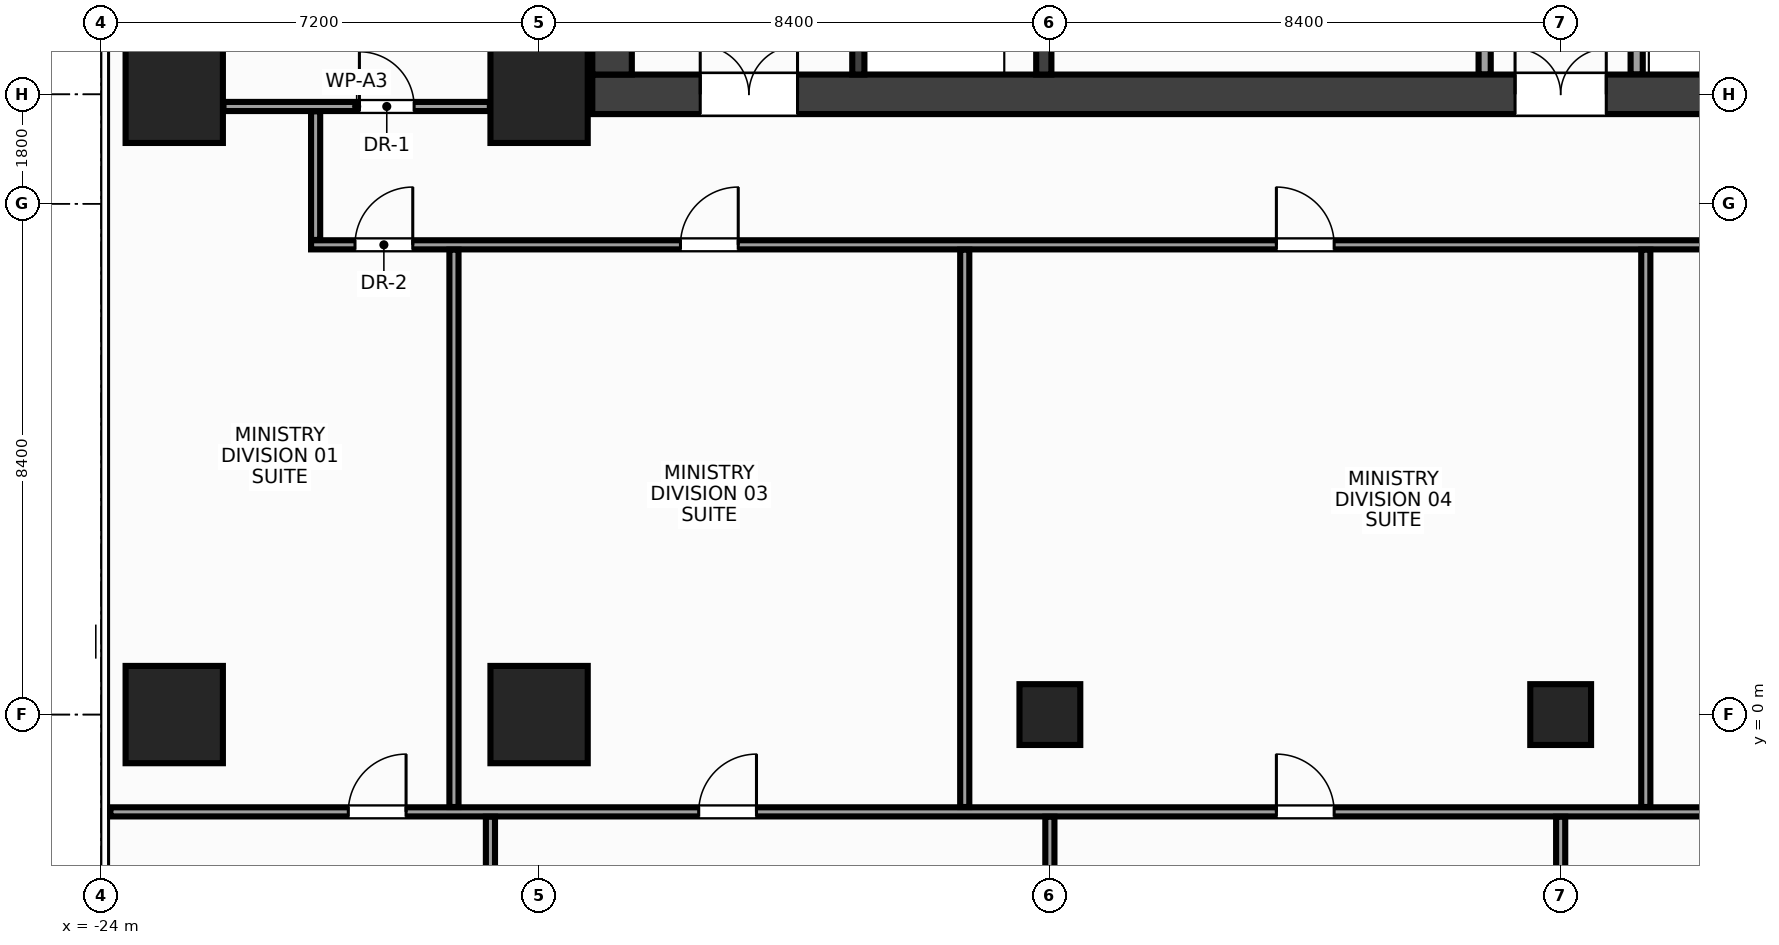
"""IFC4 building model, lengths in metres.
Left out: names, types, materials, properties, quantities, classifications, styles, units other than length and angle.
Written with IfcOpenShell. Run it as: python <this file> out.ifc"""

import sys

from ifc_helpers import new_model, si_unit, direction, frame, frame_2d, origin, origin_with_axes, origin_2d, place, context, subcontext, project, spatial, rectangle, hollow_rectangle, extrude, source, transform, mapped, element, fill, save


model = new_model("IFC4")
c1 = context("Model", 3, precision=1e-05, world=origin(), true_north=direction((0.0, 1.0)))
c2 = subcontext(c1, "Body", "Model", "MODEL_VIEW")
j1 = project(units=[si_unit("LENGTHUNIT", "METRE"), si_unit("PLANEANGLEUNIT", "RADIAN")], contexts=[c1])
p1 = place(None, origin())
s1 = spatial("IfcSite", under=j1, at=p1, CompositionType="ELEMENT")
p2 = place(p1, origin())
s2 = spatial("IfcBuilding", under=s1, at=p2, CompositionType="ELEMENT")
p3 = place(p2, frame((0.0, 0.0, 149.6)))
s3 = spatial("IfcBuildingStorey", under=s2, at=p3, CompositionType="ELEMENT", Elevation=149.6)
m1 = source(origin(), c2, "Body", "SweptSolid", [
    extrude(rectangle(XDim=31.85, YDim=0.65, at=frame_2d((15.925, 0.0))), origin(), (0.0, 0.0, 1.0), 3.6),
])
p4 = place(p3, frame((-15.925, 10.2, 0.0), z_axis=(0.0, 0.0, 1.0), x_axis=(1.0, 0.0, 0.0)))
e1 = element("IfcWall", 1, at=p4, inside=s3, PredefinedType="SHEAR", context=c2, shape_type="MappedRepresentation", body=[
    mapped(m1, transform((0.0, 0.0, 0.0), x_axis=(1.0, 0.0, 0.0), y_axis=(0.0, 1.0, 0.0), z_axis=(0.0, 0.0, 1.0), scale=1.0)),
])
p5 = place(p4, frame((1.775, 0.0, 0.0)))
e2 = element("IfcOpeningElement", 2, at=p5, cuts=e1, PredefinedType="OPENING", context=c2, shape_type="SweptSolid", body=[
    extrude(rectangle(XDim=1.6, YDim=2.15, at=frame_2d((0.8, 1.075))), frame((0.0, 0.337, 0.0), z_axis=(0.0, -1.0, 0.0), x_axis=(1.0, 0.0, 0.0)), (0.0, 0.0, 1.0), 0.674),
])
p6 = place(p4, frame((28.475, 0.0, 0.0)))
e3 = element("IfcOpeningElement", 3, at=p6, cuts=e1, PredefinedType="OPENING", context=c2, shape_type="SweptSolid", body=[
    extrude(rectangle(XDim=1.6, YDim=2.15, at=frame_2d((0.8, 1.075))), frame((0.0, 0.337, 0.0), z_axis=(0.0, -1.0, 0.0), x_axis=(1.0, 0.0, 0.0)), (0.0, 0.0, 1.0), 0.674),
])
p7 = place(p4, frame((15.175, 0.0, 0.0)))
e4 = element("IfcOpeningElement", 4, at=p7, cuts=e1, PredefinedType="OPENING", context=c2, shape_type="SweptSolid", body=[
    extrude(rectangle(XDim=1.5, YDim=2.2, at=frame_2d((0.75, 1.1))), frame((0.0, 0.337, 0.0), z_axis=(0.0, -1.0, 0.0), x_axis=(1.0, 0.0, 0.0)), (0.0, 0.0, 1.0), 0.674),
])
m2 = source(origin(), c2, "Body", "SweptSolid", [
    extrude(rectangle(XDim=12.95, YDim=0.65, at=frame_2d((6.475, 0.0))), origin(), (0.0, 0.0, 1.0), 3.6),
])
p8 = place(p3, frame((-15.6, 10.525, 0.0), z_axis=(0.0, 0.0, 1.0), x_axis=(0.0, 1.0, 0.0)))
e5 = element("IfcWall", 5, at=p8, inside=s3, PredefinedType="SHEAR", context=c2, shape_type="MappedRepresentation", body=[
    mapped(m2, transform((0.0, 0.0, 0.0), x_axis=(1.0, 0.0, 0.0), y_axis=(0.0, 1.0, 0.0), z_axis=(0.0, 0.0, 1.0), scale=1.0)),
])
m3 = source(origin(), c2, "Body", "SweptSolid", [
    extrude(rectangle(XDim=12.95, YDim=0.25, at=frame_2d((6.475, 0.0))), origin(), (0.0, 0.0, 1.0), 3.6),
])
p9 = place(p3, frame((-8.5, 10.525, 0.0), z_axis=(0.0, 0.0, 1.0), x_axis=(0.0, 1.0, 0.0)))
e6 = element("IfcWall", 6, at=p9, inside=s3, PredefinedType="SHEAR", context=c2, shape_type="MappedRepresentation", body=[
    mapped(m3, transform((0.0, 0.0, 0.0), x_axis=(1.0, 0.0, 0.0), y_axis=(0.0, 1.0, 0.0), z_axis=(0.0, 0.0, 1.0), scale=1.0)),
])
p10 = place(p9, frame((4.145, 0.0, 0.0)))
e7 = element("IfcOpeningElement", 7, at=p10, cuts=e6, PredefinedType="OPENING", context=c2, shape_type="SweptSolid", body=[
    extrude(rectangle(XDim=1.1, YDim=2.15, at=frame_2d((0.55, 1.075))), frame((0.0, 0.137, 0.0), z_axis=(0.0, -1.0, 0.0), x_axis=(1.0, 0.0, 0.0)), (0.0, 0.0, 1.0), 0.274),
])
p11 = place(p9, frame((6.065, 0.0, 0.0)))
e8 = element("IfcOpeningElement", 8, at=p11, cuts=e6, PredefinedType="OPENING", context=c2, shape_type="SweptSolid", body=[
    extrude(rectangle(XDim=1.1, YDim=2.15, at=frame_2d((0.55, 1.075))), frame((0.0, 0.137, 0.0), z_axis=(0.0, -1.0, 0.0), x_axis=(1.0, 0.0, 0.0)), (0.0, 0.0, 1.0), 0.274),
])
p12 = place(p9, frame((7.985, 0.0, 0.0)))
e9 = element("IfcOpeningElement", 9, at=p12, cuts=e6, PredefinedType="OPENING", context=c2, shape_type="SweptSolid", body=[
    extrude(rectangle(XDim=1.1, YDim=2.15, at=frame_2d((0.55, 1.075))), frame((0.0, 0.137, 0.0), z_axis=(0.0, -1.0, 0.0), x_axis=(1.0, 0.0, 0.0)), (0.0, 0.0, 1.0), 0.274),
])
m4 = source(origin(), c2, "Body", "SweptSolid", [
    extrude(rectangle(XDim=3.125, YDim=0.2, at=frame_2d((1.562, 0.0))), origin(), (0.0, 0.0, 1.0), 3.6),
])
p13 = place(p3, frame((-11.55, 10.525, 0.0), z_axis=(0.0, 0.0, 1.0), x_axis=(0.0, 1.0, 0.0)))
e10 = element("IfcWall", 10, at=p13, inside=s3, PredefinedType="SHEAR", context=c2, shape_type="MappedRepresentation", body=[
    mapped(m4, transform((0.0, 0.0, 0.0), x_axis=(1.0, 0.0, 0.0), y_axis=(0.0, 1.0, 0.0), z_axis=(0.0, 0.0, 1.0), scale=1.0)),
])
p14 = place(p13, frame((0.9, 0.0, 0.0)))
e11 = element("IfcOpeningElement", 11, at=p14, cuts=e10, PredefinedType="OPENING", context=c2, shape_type="SweptSolid", body=[
    extrude(rectangle(XDim=1.1, YDim=2.15, at=frame_2d((0.55, 1.075))), frame((0.0, 0.112, 0.0), z_axis=(0.0, -1.0, 0.0), x_axis=(1.0, 0.0, 0.0)), (0.0, 0.0, 1.0), 0.224),
])
m5 = source(origin(), c2, "Body", "SweptSolid", [
    extrude(rectangle(XDim=1.6, YDim=1.6, at=origin_2d()), origin(), (0.0, 0.0, 1.0), 3.6),
])
for number, where, z_axis, x_axis in (
    (12, (-16.8, 0.0, 0.0), (0.0, 0.0, 1.0), (1.0, 0.0, 0.0)),
    (13, (-16.8, 10.2, 0.0), (0.0, 0.0, 1.0), (1.0, 0.0, 0.0)),
    (14, (-22.8, 0.0, 0.0), (0.0, 0.0, 1.0), (1.0, 0.0, 0.0)),
    (15, (-22.8, 10.2, 0.0), (0.0, 0.0, 1.0), (1.0, 0.0, 0.0)),
):
    element("IfcColumn", number, at=place(p3, frame(where, z_axis=z_axis, x_axis=x_axis)), inside=s3, PredefinedType="COLUMN", context=c2, shape_type="MappedRepresentation", body=[
        mapped(m5, transform((0.0, 0.0, 0.0), x_axis=(1.0, 0.0, 0.0), y_axis=(0.0, 1.0, 0.0), z_axis=(0.0, 0.0, 1.0), scale=1.0)),
    ])
m6 = source(origin(), c2, "Body", "SweptSolid", [
    extrude(hollow_rectangle(XDim=1.0, YDim=1.0, WallThickness=0.045, at=origin_2d()), origin(), (0.0, 0.0, 1.0), 3.6),
])
p15 = place(p3, frame((-8.4, 0.0, 0.0), z_axis=(0.0, 0.0, 1.0), x_axis=(1.0, 0.0, 0.0)))
e16 = element("IfcColumn", 16, at=p15, inside=s3, PredefinedType="COLUMN", context=c2, shape_type="MappedRepresentation", body=[
    mapped(m6, transform((0.0, 0.0, 0.0), x_axis=(1.0, 0.0, 0.0), y_axis=(0.0, 1.0, 0.0), z_axis=(0.0, 0.0, 1.0), scale=1.0)),
])
m7 = source(origin(), c2, "Body", "SweptSolid", [
    extrude(rectangle(XDim=1.0, YDim=1.0, at=origin_2d()), origin(), (0.0, 0.0, 1.0), 3.6),
])
p16 = place(p3, origin_with_axes())
e17 = element("IfcColumn", 17, at=p16, inside=s3, PredefinedType="COLUMN", context=c2, shape_type="MappedRepresentation", body=[
    mapped(m7, transform((0.0, 0.0, 0.0), x_axis=(1.0, 0.0, 0.0), y_axis=(0.0, 1.0, 0.0), z_axis=(0.0, 0.0, 1.0), scale=1.0)),
])
m8 = source(origin(), c2, "Body", "SweptSolid", [
    extrude(rectangle(XDim=3.415, YDim=0.2, at=frame_2d((1.708, 0.0))), origin(), (0.0, 0.0, 1.0), 3.38),
])
for number, where, z_axis, x_axis in (
    (18, (-1.25, 10.525, 0.0), (0.0, 0.0, 1.0), (0.0, 1.0, 0.0)),
    (19, (1.25, 10.525, 0.0), (0.0, 0.0, 1.0), (0.0, 1.0, 0.0)),
):
    element("IfcWall", number, at=place(p3, frame(where, z_axis=z_axis, x_axis=x_axis)), inside=s3, PredefinedType="PARTITIONING", context=c2, shape_type="MappedRepresentation", body=[
        mapped(m8, transform((0.0, 0.0, 0.0), x_axis=(1.0, 0.0, 0.0), y_axis=(0.0, 1.0, 0.0), z_axis=(0.0, 0.0, 1.0), scale=1.0)),
    ])
m9 = source(origin(), c2, "Body", "SweptSolid", [
    extrude(rectangle(XDim=4.38, YDim=0.15, at=frame_2d((2.19, 0.0))), origin(), (0.0, 0.0, 1.0), 2.915),
])
p17 = place(p3, frame((-21.99, 10.0, 0.0), z_axis=(0.0, 0.0, 1.0), x_axis=(1.0, 0.0, 0.0)))
e20 = element("IfcWall", 20, at=p17, inside=s3, PredefinedType="PARTITIONING", context=c2, shape_type="MappedRepresentation", body=[
    mapped(m9, transform((0.0, 0.0, 0.0), x_axis=(1.0, 0.0, 0.0), y_axis=(0.0, 1.0, 0.0), z_axis=(0.0, 0.0, 1.0), scale=1.0)),
])
p18 = place(p17, frame((2.235, 0.0, 0.0)))
e21 = element("IfcOpeningElement", 21, at=p18, cuts=e20, PredefinedType="OPENING", context=c2, shape_type="SweptSolid", body=[
    extrude(rectangle(XDim=0.9, YDim=2.15, at=frame_2d((0.45, 1.075))), frame((0.0, 0.087, 0.0), z_axis=(0.0, -1.0, 0.0), x_axis=(1.0, 0.0, 0.0)), (0.0, 0.0, 1.0), 0.174),
])
m10 = source(origin(), c2, "Body", "SweptSolid", [
    extrude(rectangle(XDim=31.6, YDim=0.15, at=frame_2d((15.8, 0.0))), origin(), (0.0, 0.0, 1.0), 2.765),
])
p19 = place(p3, frame((-20.55, 7.725, 0.0), z_axis=(0.0, 0.0, 1.0), x_axis=(1.0, 0.0, 0.0)))
e22 = element("IfcWall", 22, at=p19, inside=s3, PredefinedType="PARTITIONING", context=c2, shape_type="MappedRepresentation", body=[
    mapped(m10, transform((0.0, 0.0, 0.0), x_axis=(1.0, 0.0, 0.0), y_axis=(0.0, 1.0, 0.0), z_axis=(0.0, 0.0, 1.0), scale=1.0)),
])
p20 = place(p19, frame((0.722, 0.0, 0.0)))
e23 = element("IfcOpeningElement", 23, at=p20, cuts=e22, PredefinedType="OPENING", context=c2, shape_type="SweptSolid", body=[
    extrude(rectangle(XDim=0.95, YDim=2.15, at=frame_2d((0.475, 1.075))), frame((0.0, 0.087, 0.0), z_axis=(0.0, -1.0, 0.0), x_axis=(1.0, 0.0, 0.0)), (0.0, 0.0, 1.0), 0.174),
])
p21 = place(p19, frame((6.075, 0.0, 0.0)))
e24 = element("IfcOpeningElement", 24, at=p21, cuts=e22, PredefinedType="OPENING", context=c2, shape_type="SweptSolid", body=[
    extrude(rectangle(XDim=0.95, YDim=2.15, at=frame_2d((0.475, 1.075))), frame((0.0, 0.087, 0.0), z_axis=(0.0, -1.0, 0.0), x_axis=(1.0, 0.0, 0.0)), (0.0, 0.0, 1.0), 0.174),
])
p22 = place(p19, frame((15.875, 0.0, 0.0)))
e25 = element("IfcOpeningElement", 25, at=p22, cuts=e22, PredefinedType="OPENING", context=c2, shape_type="SweptSolid", body=[
    extrude(rectangle(XDim=0.95, YDim=2.15, at=frame_2d((0.475, 1.075))), frame((0.0, 0.087, 0.0), z_axis=(0.0, -1.0, 0.0), x_axis=(1.0, 0.0, 0.0)), (0.0, 0.0, 1.0), 0.174),
])
p23 = place(p19, frame((26.278, 0.0, 0.0)))
e26 = element("IfcOpeningElement", 26, at=p23, cuts=e22, PredefinedType="OPENING", context=c2, shape_type="SweptSolid", body=[
    extrude(rectangle(XDim=0.95, YDim=2.15, at=frame_2d((0.475, 1.075))), frame((0.0, 0.087, 0.0), z_axis=(0.0, -1.0, 0.0), x_axis=(1.0, 0.0, 0.0)), (0.0, 0.0, 1.0), 0.174),
])
m11 = source(origin(), c2, "Body", "SweptSolid", [
    extrude(rectangle(XDim=2.115, YDim=0.15, at=frame_2d((1.058, 0.0))), origin(), (0.0, 0.0, 1.0), 3.38),
])
p24 = place(p3, frame((-20.475, 7.805, 0.0), z_axis=(0.0, 0.0, 1.0), x_axis=(0.0, 1.0, 0.0)))
e27 = element("IfcWall", 27, at=p24, inside=s3, PredefinedType="PARTITIONING", context=c2, shape_type="MappedRepresentation", body=[
    mapped(m11, transform((0.0, 0.0, 0.0), x_axis=(1.0, 0.0, 0.0), y_axis=(0.0, 1.0, 0.0), z_axis=(0.0, 0.0, 1.0), scale=1.0)),
])
m12 = source(origin(), c2, "Body", "SweptSolid", [
    extrude(rectangle(XDim=34.895, YDim=0.15, at=frame_2d((17.448, 0.0))), origin(), (0.0, 0.0, 1.0), 2.765),
])
p25 = place(p3, frame((-23.85, -1.6, 0.0), z_axis=(0.0, 0.0, 1.0), x_axis=(1.0, 0.0, 0.0)))
e28 = element("IfcWall", 28, at=p25, inside=s3, PredefinedType="PARTITIONING", context=c2, shape_type="MappedRepresentation", body=[
    mapped(m12, transform((0.0, 0.0, 0.0), x_axis=(1.0, 0.0, 0.0), y_axis=(0.0, 1.0, 0.0), z_axis=(0.0, 0.0, 1.0), scale=1.0)),
])
p26 = place(p25, frame((3.913, 0.0, 0.0)))
e29 = element("IfcOpeningElement", 29, at=p26, cuts=e28, PredefinedType="OPENING", context=c2, shape_type="SweptSolid", body=[
    extrude(rectangle(XDim=0.95, YDim=2.15, at=frame_2d((0.475, 1.075))), frame((0.0, 0.087, 0.0), z_axis=(0.0, -1.0, 0.0), x_axis=(1.0, 0.0, 0.0)), (0.0, 0.0, 1.0), 0.174),
])
p27 = place(p25, frame((9.675, 0.0, 0.0)))
e30 = element("IfcOpeningElement", 30, at=p27, cuts=e28, PredefinedType="OPENING", context=c2, shape_type="SweptSolid", body=[
    extrude(rectangle(XDim=0.95, YDim=2.15, at=frame_2d((0.475, 1.075))), frame((0.0, 0.087, 0.0), z_axis=(0.0, -1.0, 0.0), x_axis=(1.0, 0.0, 0.0)), (0.0, 0.0, 1.0), 0.174),
])
p28 = place(p25, frame((19.175, 0.0, 0.0)))
e31 = element("IfcOpeningElement", 31, at=p28, cuts=e28, PredefinedType="OPENING", context=c2, shape_type="SweptSolid", body=[
    extrude(rectangle(XDim=0.95, YDim=2.15, at=frame_2d((0.475, 1.075))), frame((0.0, 0.087, 0.0), z_axis=(0.0, -1.0, 0.0), x_axis=(1.0, 0.0, 0.0)), (0.0, 0.0, 1.0), 0.174),
])
p29 = place(p25, frame((28.275, 0.0, 0.0)))
e32 = element("IfcOpeningElement", 32, at=p29, cuts=e28, PredefinedType="OPENING", context=c2, shape_type="SweptSolid", body=[
    extrude(rectangle(XDim=0.95, YDim=2.15, at=frame_2d((0.475, 1.075))), frame((0.0, 0.087, 0.0), z_axis=(0.0, -1.0, 0.0), x_axis=(1.0, 0.0, 0.0)), (0.0, 0.0, 1.0), 0.174),
])
m13 = source(origin(), c2, "Body", "SweptSolid", [
    extrude(rectangle(XDim=9.165, YDim=0.15, at=frame_2d((4.583, 0.0))), origin(), (0.0, 0.0, 1.0), 2.915),
])
p30 = place(p3, frame((-18.2, -1.52, 0.0), z_axis=(0.0, 0.0, 1.0), x_axis=(0.0, 1.0, 0.0)))
e33 = element("IfcWall", 33, at=p30, inside=s3, PredefinedType="PARTITIONING", context=c2, shape_type="MappedRepresentation", body=[
    mapped(m13, transform((0.0, 0.0, 0.0), x_axis=(1.0, 0.0, 0.0), y_axis=(0.0, 1.0, 0.0), z_axis=(0.0, 0.0, 1.0), scale=1.0)),
])
m14 = source(origin(), c2, "Body", "SweptSolid", [
    extrude(rectangle(XDim=9.165, YDim=0.15, at=frame_2d((4.583, 0.0))), origin(), (0.0, 0.0, 1.0), 2.665),
])
for number, where, z_axis, x_axis in (
    (34, (-9.8, -1.52, 0.0), (0.0, 0.0, 1.0), (0.0, 1.0, 0.0)),
    (35, (1.4, -1.52, 0.0), (0.0, 0.0, 1.0), (0.0, 1.0, 0.0)),
):
    element("IfcWall", number, at=place(p3, frame(where, z_axis=z_axis, x_axis=x_axis)), inside=s3, PredefinedType="PARTITIONING", context=c2, shape_type="MappedRepresentation", body=[
        mapped(m14, transform((0.0, 0.0, 0.0), x_axis=(1.0, 0.0, 0.0), y_axis=(0.0, 1.0, 0.0), z_axis=(0.0, 0.0, 1.0), scale=1.0)),
    ])
m15 = source(origin(), c2, "Body", "SweptSolid", [
    extrude(rectangle(XDim=8.31, YDim=0.15, at=frame_2d((4.155, 0.0))), origin(), (0.0, 0.0, 1.0), 3.38),
])
p31 = place(p3, frame((-17.6, -9.99, 0.0), z_axis=(0.0, 0.0, 1.0), x_axis=(0.0, 1.0, 0.0)))
e36 = element("IfcWall", 36, at=p31, inside=s3, PredefinedType="PARTITIONING", context=c2, shape_type="MappedRepresentation", body=[
    mapped(m15, transform((0.0, 0.0, 0.0), x_axis=(1.0, 0.0, 0.0), y_axis=(0.0, 1.0, 0.0), z_axis=(0.0, 0.0, 1.0), scale=1.0)),
])
m16 = source(origin(), c2, "Body", "SweptSolid", [
    extrude(rectangle(XDim=8.61, YDim=0.15, at=frame_2d((4.305, 0.0))), origin(), (0.0, 0.0, 1.0), 2.765),
])
for number, where, z_axis, x_axis in (
    (37, (-8.4, -10.29, 0.0), (0.0, 0.0, 1.0), (0.0, 1.0, 0.0)),
    (38, (0.0, -10.29, 0.0), (0.0, 0.0, 1.0), (0.0, 1.0, 0.0)),
):
    element("IfcWall", number, at=place(p3, frame(where, z_axis=z_axis, x_axis=x_axis)), inside=s3, PredefinedType="PARTITIONING", context=c2, shape_type="MappedRepresentation", body=[
        mapped(m16, transform((0.0, 0.0, 0.0), x_axis=(1.0, 0.0, 0.0), y_axis=(0.0, 1.0, 0.0), z_axis=(0.0, 0.0, 1.0), scale=1.0)),
    ])
m17 = source(origin(), c2, "Body", "SweptSolid", [
    extrude(rectangle(XDim=1.6, YDim=2.15, at=frame_2d((0.8, 1.075))), frame((0.0, 0.025, 0.0), z_axis=(0.0, -1.0, 0.0), x_axis=(1.0, 0.0, 0.0)), (0.0, 0.0, 1.0), 0.05),
])
p32 = place(p5, origin())
e39 = element("IfcDoor", 39, at=p32, inside=s3, OperationType="DOUBLE_DOOR_SINGLE_SWING", PredefinedType="DOOR", context=c2, shape_type="MappedRepresentation", body=[
    mapped(m17, transform((0.0, 0.0, 0.0), x_axis=(1.0, 0.0, 0.0), y_axis=(0.0, 1.0, 0.0), z_axis=(0.0, 0.0, 1.0), scale=1.0)),
])
fill(e2, e39)
m18 = source(origin(), c2, "Body", "SweptSolid", [
    extrude(rectangle(XDim=1.5, YDim=2.2, at=frame_2d((0.75, 1.1))), frame((0.0, 0.025, 0.0), z_axis=(0.0, -1.0, 0.0), x_axis=(1.0, 0.0, 0.0)), (0.0, 0.0, 1.0), 0.05),
])
p33 = place(p7, origin())
e40 = element("IfcDoor", 40, at=p33, inside=s3, OperationType="DOUBLE_DOOR_SINGLE_SWING", PredefinedType="DOOR", context=c2, shape_type="MappedRepresentation", body=[
    mapped(m18, transform((0.0, 0.0, 0.0), x_axis=(1.0, 0.0, 0.0), y_axis=(0.0, 1.0, 0.0), z_axis=(0.0, 0.0, 1.0), scale=1.0)),
])
fill(e4, e40)
m19 = source(origin(), c2, "Body", "SweptSolid", [
    extrude(rectangle(XDim=0.9, YDim=2.15, at=frame_2d((0.45, 1.075))), frame((0.0, 0.025, 0.0), z_axis=(0.0, -1.0, 0.0), x_axis=(1.0, 0.0, 0.0)), (0.0, 0.0, 1.0), 0.05),
])
p34 = place(p18, origin())
e41 = element("IfcDoor", 41, at=p34, inside=s3, OperationType="SINGLE_SWING_LEFT", PredefinedType="DOOR", context=c2, shape_type="MappedRepresentation", body=[
    mapped(m19, transform((0.0, 0.0, 0.0), x_axis=(1.0, 0.0, 0.0), y_axis=(0.0, 1.0, 0.0), z_axis=(0.0, 0.0, 1.0), scale=1.0)),
])
fill(e21, e41)
m20 = source(origin(), c2, "Body", "SweptSolid", [
    extrude(rectangle(XDim=0.95, YDim=2.15, at=frame_2d((0.475, 1.075))), frame((0.0, 0.025, 0.0), z_axis=(0.0, -1.0, 0.0), x_axis=(1.0, 0.0, 0.0)), (0.0, 0.0, 1.0), 0.05),
])
p35 = place(p20, origin())
e42 = element("IfcDoor", 42, at=p35, inside=s3, OperationType="SINGLE_SWING_RIGHT", PredefinedType="DOOR", context=c2, shape_type="MappedRepresentation", body=[
    mapped(m20, transform((0.0, 0.0, 0.0), x_axis=(1.0, 0.0, 0.0), y_axis=(0.0, 1.0, 0.0), z_axis=(0.0, 0.0, 1.0), scale=1.0)),
])
fill(e23, e42)
p36 = place(p21, origin())
e43 = element("IfcDoor", 43, at=p36, inside=s3, OperationType="SINGLE_SWING_RIGHT", PredefinedType="DOOR", context=c2, shape_type="MappedRepresentation", body=[
    mapped(m20, transform((0.0, 0.0, 0.0), x_axis=(1.0, 0.0, 0.0), y_axis=(0.0, 1.0, 0.0), z_axis=(0.0, 0.0, 1.0), scale=1.0)),
])
fill(e24, e43)
p37 = place(p22, origin())
e44 = element("IfcDoor", 44, at=p37, inside=s3, OperationType="SINGLE_SWING_LEFT", PredefinedType="DOOR", context=c2, shape_type="MappedRepresentation", body=[
    mapped(m20, transform((0.0, 0.0, 0.0), x_axis=(1.0, 0.0, 0.0), y_axis=(0.0, 1.0, 0.0), z_axis=(0.0, 0.0, 1.0), scale=1.0)),
])
fill(e25, e44)
p38 = place(p26, origin())
e45 = element("IfcDoor", 45, at=p38, inside=s3, OperationType="SINGLE_SWING_RIGHT", PredefinedType="DOOR", context=c2, shape_type="MappedRepresentation", body=[
    mapped(m20, transform((0.0, 0.0, 0.0), x_axis=(1.0, 0.0, 0.0), y_axis=(0.0, 1.0, 0.0), z_axis=(0.0, 0.0, 1.0), scale=1.0)),
])
fill(e29, e45)
p39 = place(p27, origin())
e46 = element("IfcDoor", 46, at=p39, inside=s3, OperationType="SINGLE_SWING_RIGHT", PredefinedType="DOOR", context=c2, shape_type="MappedRepresentation", body=[
    mapped(m20, transform((0.0, 0.0, 0.0), x_axis=(1.0, 0.0, 0.0), y_axis=(0.0, 1.0, 0.0), z_axis=(0.0, 0.0, 1.0), scale=1.0)),
])
fill(e30, e46)
p40 = place(p28, origin())
e47 = element("IfcDoor", 47, at=p40, inside=s3, OperationType="SINGLE_SWING_LEFT", PredefinedType="DOOR", context=c2, shape_type="MappedRepresentation", body=[
    mapped(m20, transform((0.0, 0.0, 0.0), x_axis=(1.0, 0.0, 0.0), y_axis=(0.0, 1.0, 0.0), z_axis=(0.0, 0.0, 1.0), scale=1.0)),
])
fill(e31, e47)
save(model, sys.argv[1])
